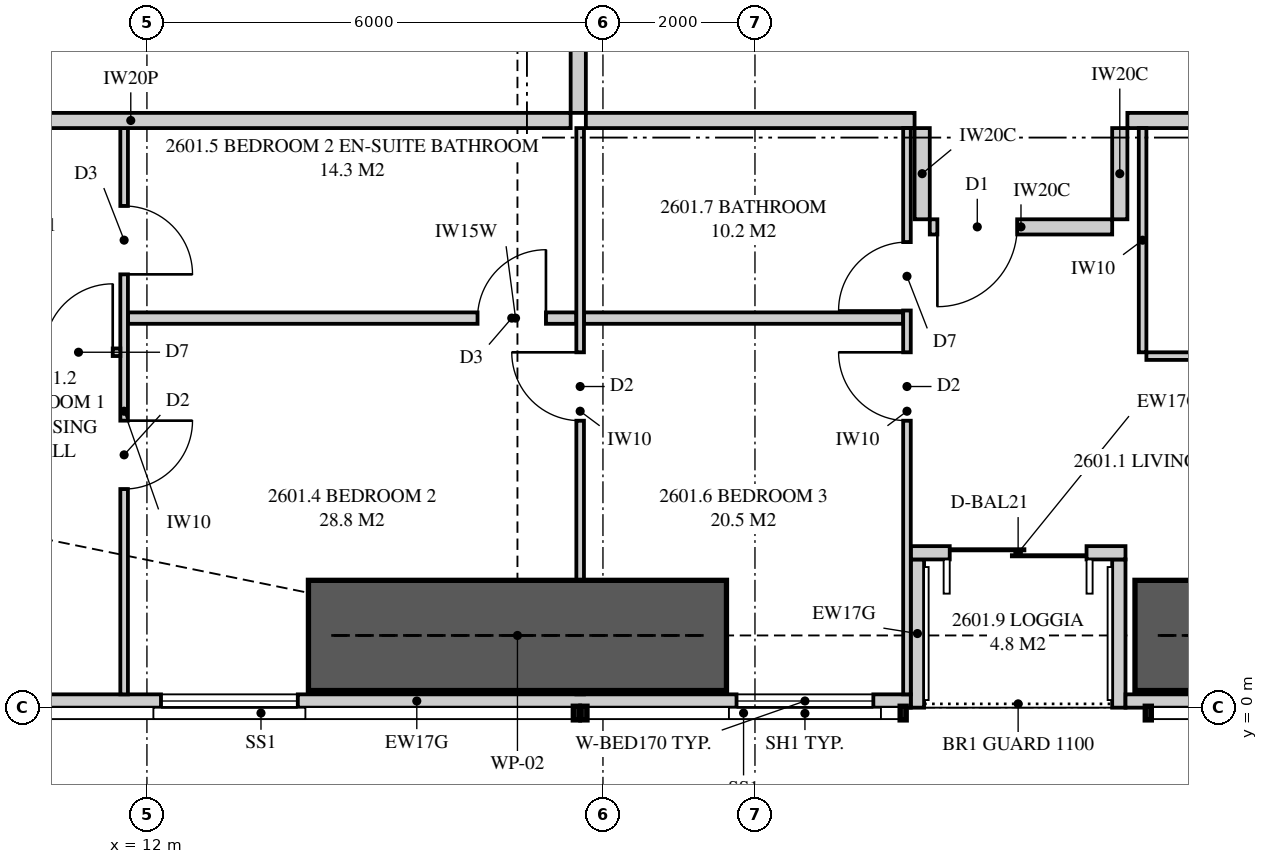
"""IFC4 building model, lengths in metres.
Left out: names, types, materials, properties, quantities, classifications, styles, units other than length and angle.
Written with IfcOpenShell. Run it as: python <this file> out.ifc"""

import sys

from ifc_helpers import new_model, si_unit, direction, frame, frame_2d, origin, place, context, subcontext, project, spatial, polyline, rectangle, outline, extrude, element, fill, save


model = new_model("IFC4")
c1 = context("Model", 3, precision=1e-05, world=origin(), true_north=direction((0.0, 1.0)))
c2 = subcontext(c1, "Body", "Model", "MODEL_VIEW")
j1 = project(units=[si_unit("LENGTHUNIT", "METRE"), si_unit("PLANEANGLEUNIT", "RADIAN")], contexts=[c1])
p1 = place(None, origin())
s1 = spatial("IfcSite", under=j1, at=p1, CompositionType="ELEMENT")
p2 = place(p1, origin())
s2 = spatial("IfcBuilding", under=s1, at=p2, CompositionType="ELEMENT")
p3 = place(p2, frame((0.0, 0.0, 98.15)))
s3 = spatial("IfcBuildingStorey", under=s2, at=p3, CompositionType="ELEMENT", Elevation=98.15)
p4 = place(p3, frame((9.051, 0.087, 0.0), z_axis=(0.0, 0.0, 1.0), x_axis=(1.0, 0.0, 0.0)))
e1 = element("IfcWall", 1, at=p4, inside=s3, PredefinedType="SOLIDWALL", context=c2, shape_type="SweptSolid", body=[
    extrude(outline(polyline([(0.0, 0.0), (12.999, 0.0), (12.999, 2.15), (7.824, 2.15), (7.824, 3.11), (7.666, 3.11), (7.666, 2.15), (7.62, 2.15), (7.62, 3.11), (0.0, 3.11), (0.0, 0.0)])), frame((0.0, 0.087, 0.0), z_axis=(0.0, -1.0, 0.0), x_axis=(1.0, 0.0, 0.0)), (0.0, 0.0, 1.0), 0.175),
])
p5 = place(p4, frame((3.134, 0.0, 0.4)))
e2 = element("IfcOpeningElement", 2, at=p5, cuts=e1, PredefinedType="OPENING", context=c2, shape_type="SweptSolid", body=[
    extrude(rectangle(XDim=1.8, YDim=1.7, at=frame_2d((0.9, 0.85))), frame((0.0, 0.097, 0.0), z_axis=(0.0, -1.0, 0.0), x_axis=(1.0, 0.0, 0.0)), (0.0, 0.0, 1.0), 0.195),
])
p6 = place(p4, frame((10.706, 0.0, 0.4)))
e3 = element("IfcOpeningElement", 3, at=p6, cuts=e1, PredefinedType="OPENING", context=c2, shape_type="SweptSolid", body=[
    extrude(rectangle(XDim=1.8, YDim=1.7, at=frame_2d((0.9, 0.85))), frame((0.0, 0.097, 0.0), z_axis=(0.0, -1.0, 0.0), x_axis=(1.0, 0.0, 0.0)), (0.0, 0.0, 1.0), 0.195),
])
p7 = place(p3, frame((24.875, 0.087, 0.0), z_axis=(0.0, 0.0, 1.0), x_axis=(1.0, 0.0, 0.0)))
e4 = element("IfcWall", 4, at=p7, inside=s3, PredefinedType="SOLIDWALL", context=c2, shape_type="SweptSolid", body=[
    extrude(rectangle(XDim=7.9, YDim=0.175, at=frame_2d((3.95, 0.0))), origin(), (0.0, 0.0, 1.0), 2.15),
])
p8 = place(p7, frame((5.725, 0.0, 0.4)))
e5 = element("IfcOpeningElement", 5, at=p8, cuts=e4, PredefinedType="OPENING", context=c2, shape_type="SweptSolid", body=[
    extrude(rectangle(XDim=1.8, YDim=1.7, at=frame_2d((0.9, 0.85))), frame((0.0, 0.097, 0.0), z_axis=(0.0, -1.0, 0.0), x_axis=(1.0, 0.0, 0.0)), (0.0, 0.0, 1.0), 0.195),
])
p9 = place(p3, frame((22.05, 2.038, 0.0), z_axis=(0.0, 0.0, 1.0), x_axis=(1.0, 0.0, 0.0)))
e6 = element("IfcWall", 6, at=p9, inside=s3, PredefinedType="SOLIDWALL", context=c2, shape_type="SweptSolid", body=[
    extrude(rectangle(XDim=2.825, YDim=0.175, at=frame_2d((1.413, 0.0))), origin(), (0.0, 0.0, 1.0), 3.11),
])
p10 = place(p9, frame((0.512, 0.0, 0.0)))
e7 = element("IfcOpeningElement", 7, at=p10, cuts=e6, PredefinedType="OPENING", context=c2, shape_type="SweptSolid", body=[
    extrude(rectangle(XDim=1.8, YDim=2.1, at=frame_2d((0.9, 1.05))), frame((0.0, 0.097, 0.0), z_axis=(0.0, -1.0, 0.0), x_axis=(1.0, 0.0, 0.0)), (0.0, 0.0, 1.0), 0.195),
])
for number, where, z_axis, x_axis in (
    (8, (22.137, 0.0, 0.0), (0.0, 0.0, 1.0), (0.0, 1.0, 0.0)),
    (9, (24.788, 0.0, 0.0), (0.0, 0.0, 1.0), (0.0, 1.0, 0.0)),
):
    element("IfcWall", number, at=place(p3, frame(where, z_axis=z_axis, x_axis=x_axis)), inside=s3, PredefinedType="SOLIDWALL", context=c2, shape_type="SweptSolid", body=[
        extrude(outline(polyline([(0.0, 0.0), (1.95, 0.0), (1.95, 3.11), (1.75, 3.11), (1.75, 2.15), (0.15, 2.15), (0.15, 3.11), (0.0, 3.11), (0.0, 0.0)])), frame((0.0, 0.087, 0.0), z_axis=(0.0, -1.0, 0.0), x_axis=(1.0, 0.0, 0.0)), (0.0, 0.0, 1.0), 0.175),
    ])
p11 = place(p3, frame((17.775, 7.725, 0.0), z_axis=(0.0, 0.0, 1.0), x_axis=(1.0, 0.0, 0.0)))
e10 = element("IfcWall", 10, at=p11, inside=s3, PredefinedType="PARTITIONING", context=c2, shape_type="SweptSolid", body=[
    extrude(rectangle(XDim=4.325, YDim=0.2, at=frame_2d((2.163, 0.0))), origin(), (0.0, 0.0, 1.0), 3.11),
])
p12 = place(p3, frame((11.7, 0.175, 0.0), z_axis=(0.0, 0.0, 1.0), x_axis=(0.0, 1.0, 0.0)))
e11 = element("IfcWall", 11, at=p12, inside=s3, PredefinedType="PARTITIONING", context=c2, shape_type="SweptSolid", body=[
    extrude(outline(polyline([(0.0, 0.0), (7.45, 0.0), (7.45, 3.11), (2.708, 3.11), (2.708, 2.15), (0.953, 2.15), (0.953, 3.11), (0.0, 3.11), (0.0, 0.0)])), frame((0.0, 0.05, 0.0), z_axis=(0.0, -1.0, 0.0), x_axis=(1.0, 0.0, 0.0)), (0.0, 0.0, 1.0), 0.1),
])
p13 = place(p12, frame((2.701, 0.0, 0.0)))
e12 = element("IfcOpeningElement", 12, at=p13, cuts=e11, PredefinedType="OPENING", context=c2, shape_type="SweptSolid", body=[
    extrude(rectangle(XDim=0.9, YDim=2.1, at=frame_2d((0.45, 1.05))), frame((0.0, 0.06, 0.0), z_axis=(0.0, -1.0, 0.0), x_axis=(1.0, 0.0, 0.0)), (0.0, 0.0, 1.0), 0.12),
])
p14 = place(p12, frame((5.525, 0.0, 0.0)))
e13 = element("IfcOpeningElement", 13, at=p14, cuts=e11, PredefinedType="OPENING", context=c2, shape_type="SweptSolid", body=[
    extrude(rectangle(XDim=0.9, YDim=2.1, at=frame_2d((0.45, 1.05))), frame((0.0, 0.06, 0.0), z_axis=(0.0, -1.0, 0.0), x_axis=(1.0, 0.0, 0.0)), (0.0, 0.0, 1.0), 0.12),
])
p15 = place(p3, frame((17.7, 0.175, 0.0), z_axis=(0.0, 0.0, 1.0), x_axis=(0.0, 1.0, 0.0)))
e14 = element("IfcWall", 14, at=p15, inside=s3, PredefinedType="PARTITIONING", context=c2, shape_type="SweptSolid", body=[
    extrude(outline(polyline([(1.635, 2.15), (0.0, 2.15), (0.0, 0.0), (7.45, 0.0), (7.45, 3.11), (1.635, 3.11), (1.635, 2.15)]), holes=[polyline([(1.021, 0.116), (0.529, 0.116), (0.529, 0.906), (1.021, 0.906), (1.021, 0.116)]), polyline([(1.021, 1.244), (0.529, 1.244), (0.529, 2.034), (1.021, 2.034), (1.021, 1.244)])]), frame((0.0, 0.05, 0.0), z_axis=(0.0, -1.0, 0.0), x_axis=(1.0, 0.0, 0.0)), (0.0, 0.0, 1.0), 0.1),
])
p16 = place(p15, frame((3.6, 0.0, 0.0)))
e15 = element("IfcOpeningElement", 15, at=p16, cuts=e14, PredefinedType="OPENING", context=c2, shape_type="SweptSolid", body=[
    extrude(rectangle(XDim=0.9, YDim=2.1, at=frame_2d((0.45, 1.05))), frame((0.0, 0.06, 0.0), z_axis=(0.0, -1.0, 0.0), x_axis=(1.0, 0.0, 0.0)), (0.0, 0.0, 1.0), 0.12),
])
p17 = place(p3, frame((22.0, 0.175, 0.0), z_axis=(0.0, 0.0, 1.0), x_axis=(0.0, 1.0, 0.0)))
e16 = element("IfcWall", 16, at=p17, inside=s3, PredefinedType="PARTITIONING", context=c2, shape_type="SweptSolid", body=[
    extrude(outline(polyline([(0.0, 0.0), (7.45, 0.0), (7.45, 3.11), (1.635, 3.11), (1.635, 2.15), (0.0, 2.15), (0.0, 3.11), (0.0, 0.0)])), frame((0.0, 0.05, 0.0), z_axis=(0.0, -1.0, 0.0), x_axis=(1.0, 0.0, 0.0)), (0.0, 0.0, 1.0), 0.1),
])
p18 = place(p17, frame((3.6, 0.0, 0.0)))
e17 = element("IfcOpeningElement", 17, at=p18, cuts=e16, PredefinedType="OPENING", context=c2, shape_type="SweptSolid", body=[
    extrude(rectangle(XDim=0.9, YDim=2.1, at=frame_2d((0.45, 1.05))), frame((0.0, 0.06, 0.0), z_axis=(0.0, -1.0, 0.0), x_axis=(1.0, 0.0, 0.0)), (0.0, 0.0, 1.0), 0.12),
])
p19 = place(p17, frame((5.05, 0.0, 0.0)))
e18 = element("IfcOpeningElement", 18, at=p19, cuts=e16, PredefinedType="OPENING", context=c2, shape_type="SweptSolid", body=[
    extrude(rectangle(XDim=0.9, YDim=2.1, at=frame_2d((0.45, 1.05))), frame((0.0, 0.06, 0.0), z_axis=(0.0, -1.0, 0.0), x_axis=(1.0, 0.0, 0.0)), (0.0, 0.0, 1.0), 0.12),
])
p20 = place(p3, frame((6.0, 4.676, 0.0), z_axis=(0.0, 0.0, 1.0), x_axis=(1.0, 0.0, 0.0)))
e19 = element("IfcWall", 19, at=p20, inside=s3, PredefinedType="PARTITIONING", context=c2, shape_type="SweptSolid", body=[
    extrude(outline(polyline([(0.0, 0.0), (5.65, 0.0), (5.65, 3.11), (5.46, 3.11), (5.46, 2.51), (3.171, 2.51), (3.171, 2.15), (1.429, 2.15), (1.429, 3.11), (0.0, 3.11), (0.0, 0.0)])), frame((0.0, 0.05, 0.0), z_axis=(0.0, -1.0, 0.0), x_axis=(1.0, 0.0, 0.0)), (0.0, 0.0, 1.0), 0.1),
])
p21 = place(p20, frame((4.65, 0.0, 0.0)))
e20 = element("IfcOpeningElement", 20, at=p21, cuts=e19, PredefinedType="OPENING", context=c2, shape_type="SweptSolid", body=[
    extrude(rectangle(XDim=0.9, YDim=2.1, at=frame_2d((0.45, 1.05))), frame((0.0, 0.06, 0.0), z_axis=(0.0, -1.0, 0.0), x_axis=(1.0, 0.0, 0.0)), (0.0, 0.0, 1.0), 0.12),
])
p22 = place(p3, frame((11.75, 5.125, 0.0), z_axis=(0.0, 0.0, 1.0), x_axis=(1.0, 0.0, 0.0)))
e21 = element("IfcWall", 21, at=p22, inside=s3, PredefinedType="PLUMBINGWALL", context=c2, shape_type="SweptSolid", body=[
    extrude(outline(polyline([(0.0, 0.0), (5.9, 0.0), (5.9, 3.11), (5.438, 3.11), (5.438, 2.541), (4.812, 2.541), (4.812, 3.11), (0.0, 3.11), (0.0, 0.0)])), frame((0.0, 0.075, 0.0), z_axis=(0.0, -1.0, 0.0), x_axis=(1.0, 0.0, 0.0)), (0.0, 0.0, 1.0), 0.15),
])
p23 = place(p22, frame((4.6, 0.0, 0.0)))
e22 = element("IfcOpeningElement", 22, at=p23, cuts=e21, PredefinedType="OPENING", context=c2, shape_type="SweptSolid", body=[
    extrude(rectangle(XDim=0.9, YDim=2.1, at=frame_2d((0.45, 1.05))), frame((0.0, 0.085, 0.0), z_axis=(0.0, -1.0, 0.0), x_axis=(1.0, 0.0, 0.0)), (0.0, 0.0, 1.0), 0.17),
])
p24 = place(p3, frame((17.75, 5.125, 0.0), z_axis=(0.0, 0.0, 1.0), x_axis=(1.0, 0.0, 0.0)))
e23 = element("IfcWall", 23, at=p24, inside=s3, PredefinedType="PLUMBINGWALL", context=c2, shape_type="SweptSolid", body=[
    extrude(rectangle(XDim=4.2, YDim=0.15, at=frame_2d((2.1, 0.0))), origin(), (0.0, 0.0, 1.0), 3.11),
])
p25 = place(p3, frame((25.15, 4.625, 0.0), z_axis=(0.0, 0.0, 1.0), x_axis=(1.0, 0.0, 0.0)))
e24 = element("IfcWall", 24, at=p25, inside=s3, PredefinedType="PARTITIONING", context=c2, shape_type="SweptSolid", body=[
    extrude(outline(polyline([(0.0, 0.0), (3.55, 0.0), (3.55, 3.11), (2.887, 3.11), (2.887, 2.541), (2.312, 2.541), (2.312, 3.11), (0.0, 3.11), (0.0, 0.0)])), frame((0.0, 0.05, 0.0), z_axis=(0.0, -1.0, 0.0), x_axis=(1.0, 0.0, 0.0)), (0.0, 0.0, 1.0), 0.1),
])
p26 = place(p25, frame((1.3, 0.0, 0.0)))
e25 = element("IfcOpeningElement", 25, at=p26, cuts=e24, PredefinedType="OPENING", context=c2, shape_type="SweptSolid", body=[
    extrude(rectangle(XDim=0.9, YDim=2.1, at=frame_2d((0.45, 1.05))), frame((0.0, 0.06, 0.0), z_axis=(0.0, -1.0, 0.0), x_axis=(1.0, 0.0, 0.0)), (0.0, 0.0, 1.0), 0.12),
])
p27 = place(p3, frame((25.1, 4.675, 0.0), z_axis=(0.0, 0.0, 1.0), x_axis=(0.0, 1.0, 0.0)))
e26 = element("IfcWall", 26, at=p27, inside=s3, PredefinedType="PARTITIONING", context=c2, shape_type="SweptSolid", body=[
    extrude(rectangle(XDim=2.95, YDim=0.1, at=frame_2d((1.475, 0.0))), origin(), (0.0, 0.0, 1.0), 3.11),
])
p28 = place(p3, frame((6.0, 7.725, 0.0), z_axis=(0.0, 0.0, 1.0), x_axis=(1.0, 0.0, 0.0)))
e27 = element("IfcWall", 27, at=p28, inside=s3, PredefinedType="PARTITIONING", context=c2, shape_type="SweptSolid", body=[
    extrude(outline(polyline([(0.0, 0.0), (11.575, 0.0), (11.575, 3.11), (11.212, 3.11), (11.212, 2.541), (10.538, 2.541), (10.538, 3.11), (5.51, 3.11), (5.51, 2.51), (2.969, 2.51), (2.969, 2.541), (2.727, 2.541), (2.727, 2.15), (0.884, 2.15), (0.884, 3.11), (0.0, 3.11), (0.0, 0.0)])), frame((0.0, 0.1, 0.0), z_axis=(0.0, -1.0, 0.0), x_axis=(1.0, 0.0, 0.0)), (0.0, 0.0, 1.0), 0.2),
])
p29 = place(p3, frame((17.675, 7.825, 0.0), z_axis=(0.0, 0.0, 1.0), x_axis=(0.0, 1.0, 0.0)))
e28 = element("IfcWall", 28, at=p29, inside=s3, PredefinedType="PARTITIONING", context=c2, shape_type="SweptSolid", body=[
    extrude(outline(polyline([(0.0, 0.0), (5.825, 0.0), (5.825, 3.11), (3.087, 3.11), (3.087, 2.541), (2.413, 2.541), (2.413, 3.11), (0.0, 3.11), (0.0, 0.0)])), frame((0.0, 0.1, 0.0), z_axis=(0.0, -1.0, 0.0), x_axis=(1.0, 0.0, 0.0)), (0.0, 0.0, 1.0), 0.2),
])
p30 = place(p29, frame((2.337, 0.0, 0.0)))
e29 = element("IfcOpeningElement", 29, at=p30, cuts=e28, PredefinedType="OPENING", context=c2, shape_type="SweptSolid", body=[
    extrude(rectangle(XDim=1.8, YDim=2.1, at=frame_2d((0.9, 1.05))), frame((0.0, 0.11, 0.0), z_axis=(0.0, -1.0, 0.0), x_axis=(1.0, 0.0, 0.0)), (0.0, 0.0, 1.0), 0.22),
])
p31 = place(p3, frame((24.9, 7.725, 0.0), z_axis=(0.0, 0.0, 1.0), x_axis=(1.0, 0.0, 0.0)))
e30 = element("IfcWall", 30, at=p31, inside=s3, PredefinedType="PARTITIONING", context=c2, shape_type="SweptSolid", body=[
    extrude(outline(polyline([(0.0, 0.0), (3.8, 0.0), (3.8, 3.11), (3.187, 3.11), (3.187, 2.541), (2.513, 2.541), (2.513, 3.11), (0.0, 3.11), (0.0, 0.0)])), frame((0.0, 0.1, 0.0), z_axis=(0.0, -1.0, 0.0), x_axis=(1.0, 0.0, 0.0)), (0.0, 0.0, 1.0), 0.2),
])
p32 = place(p3, frame((22.3, 6.325, 0.0), z_axis=(0.0, 0.0, 1.0), x_axis=(1.0, 0.0, 0.0)))
e31 = element("IfcWall", 31, at=p32, inside=s3, PredefinedType="PARTITIONING", context=c2, shape_type="SweptSolid", body=[
    extrude(rectangle(XDim=2.4, YDim=0.2, at=frame_2d((1.2, 0.0))), origin(), (0.0, 0.0, 1.0), 3.11),
])
p33 = place(p32, frame((0.1, 0.0, 0.0)))
e32 = element("IfcOpeningElement", 32, at=p33, cuts=e31, PredefinedType="OPENING", context=c2, shape_type="SweptSolid", body=[
    extrude(rectangle(XDim=1.05, YDim=2.2, at=frame_2d((0.525, 1.1))), frame((0.0, 0.11, 0.0), z_axis=(0.0, -1.0, 0.0), x_axis=(1.0, 0.0, 0.0)), (0.0, 0.0, 1.0), 0.22),
])
for number, where, z_axis, x_axis in (
    (33, (22.2, 7.625, 0.0), (0.0, 0.0, 1.0), (0.0, -1.0, 0.0)),
    (34, (24.8, 7.625, 0.0), (0.0, 0.0, 1.0), (0.0, -1.0, 0.0)),
):
    element("IfcWall", number, at=place(p3, frame(where, z_axis=z_axis, x_axis=x_axis)), inside=s3, PredefinedType="PARTITIONING", context=c2, shape_type="SweptSolid", body=[
        extrude(rectangle(XDim=1.2, YDim=0.2, at=frame_2d((0.6, 0.0))), origin(), (0.0, 0.0, 1.0), 3.11),
    ])
for number, where, z_axis, x_axis in (
    (35, (14.125, 0.95, 0.0), (0.0, 0.0, 1.0), (1.0, 0.0, 0.0)),
    (36, (25.0, 0.95, 0.0), (0.0, 0.0, 1.0), (1.0, 0.0, 0.0)),
):
    element("IfcWall", number, at=place(p3, frame(where, z_axis=z_axis, x_axis=x_axis)), inside=s3, PredefinedType="SHEAR", context=c2, shape_type="SweptSolid", body=[
        extrude(rectangle(XDim=5.5, YDim=1.45, at=frame_2d((2.75, 0.0))), origin(), (0.0, 0.0, 1.0), 3.35),
    ])
p34 = place(p5, origin())
e37 = element("IfcWindow", 37, at=p34, inside=s3, PartitioningType="SINGLE_PANEL", PredefinedType="WINDOW", context=c2, shape_type="SweptSolid", body=[
    extrude(rectangle(XDim=1.8, YDim=1.7, at=frame_2d((0.9, 0.85))), frame((0.0, 0.03, 0.0), z_axis=(0.0, -1.0, 0.0), x_axis=(1.0, 0.0, 0.0)), (0.0, 0.0, 1.0), 0.06),
])
fill(e2, e37)
p35 = place(p6, origin())
e38 = element("IfcWindow", 38, at=p35, inside=s3, PartitioningType="SINGLE_PANEL", PredefinedType="WINDOW", context=c2, shape_type="SweptSolid", body=[
    extrude(rectangle(XDim=1.8, YDim=1.7, at=frame_2d((0.9, 0.85))), frame((0.0, 0.03, 0.0), z_axis=(0.0, -1.0, 0.0), x_axis=(1.0, 0.0, 0.0)), (0.0, 0.0, 1.0), 0.06),
])
fill(e3, e38)
p36 = place(p10, origin())
e39 = element("IfcDoor", 39, at=p36, inside=s3, OperationType="SLIDING_TO_LEFT", PredefinedType="DOOR", context=c2, shape_type="SweptSolid", body=[
    extrude(rectangle(XDim=1.8, YDim=2.1, at=frame_2d((0.9, 1.05))), frame((0.0, 0.025, 0.0), z_axis=(0.0, -1.0, 0.0), x_axis=(1.0, 0.0, 0.0)), (0.0, 0.0, 1.0), 0.05),
])
fill(e7, e39)
p37 = place(p33, frame((1.05, 0.0, 0.0), z_axis=(0.0, 0.0, 1.0), x_axis=(-1.0, 0.0, 0.0)))
e40 = element("IfcDoor", 40, at=p37, inside=s3, OperationType="SINGLE_SWING_RIGHT", PredefinedType="DOOR", context=c2, shape_type="SweptSolid", body=[
    extrude(rectangle(XDim=1.05, YDim=2.2, at=frame_2d((0.525, 1.1))), frame((0.0, 0.025, 0.0), z_axis=(0.0, -1.0, 0.0), x_axis=(1.0, 0.0, 0.0)), (0.0, 0.0, 1.0), 0.05),
])
fill(e32, e40)
p38 = place(p21, origin())
e41 = element("IfcDoor", 41, at=p38, inside=s3, OperationType="SINGLE_SWING_RIGHT", PredefinedType="DOOR", context=c2, shape_type="SweptSolid", body=[
    extrude(rectangle(XDim=0.9, YDim=2.1, at=frame_2d((0.45, 1.05))), frame((0.0, 0.025, 0.0), z_axis=(0.0, -1.0, 0.0), x_axis=(1.0, 0.0, 0.0)), (0.0, 0.0, 1.0), 0.05),
])
fill(e20, e41)
p39 = place(p13, frame((0.9, 0.0, 0.0), z_axis=(0.0, 0.0, 1.0), x_axis=(-1.0, 0.0, 0.0)))
e42 = element("IfcDoor", 42, at=p39, inside=s3, OperationType="SINGLE_SWING_LEFT", PredefinedType="DOOR", context=c2, shape_type="SweptSolid", body=[
    extrude(rectangle(XDim=0.9, YDim=2.1, at=frame_2d((0.45, 1.05))), frame((0.0, 0.025, 0.0), z_axis=(0.0, -1.0, 0.0), x_axis=(1.0, 0.0, 0.0)), (0.0, 0.0, 1.0), 0.05),
])
fill(e12, e42)
p40 = place(p16, origin())
e43 = element("IfcDoor", 43, at=p40, inside=s3, OperationType="SINGLE_SWING_RIGHT", PredefinedType="DOOR", context=c2, shape_type="SweptSolid", body=[
    extrude(rectangle(XDim=0.9, YDim=2.1, at=frame_2d((0.45, 1.05))), frame((0.0, 0.025, 0.0), z_axis=(0.0, -1.0, 0.0), x_axis=(1.0, 0.0, 0.0)), (0.0, 0.0, 1.0), 0.05),
])
fill(e15, e43)
p41 = place(p23, origin())
e44 = element("IfcDoor", 44, at=p41, inside=s3, OperationType="SINGLE_SWING_RIGHT", PredefinedType="DOOR", context=c2, shape_type="SweptSolid", body=[
    extrude(rectangle(XDim=0.9, YDim=2.1, at=frame_2d((0.45, 1.05))), frame((0.0, 0.025, 0.0), z_axis=(0.0, -1.0, 0.0), x_axis=(1.0, 0.0, 0.0)), (0.0, 0.0, 1.0), 0.05),
])
fill(e22, e44)
p42 = place(p18, origin())
e45 = element("IfcDoor", 45, at=p42, inside=s3, OperationType="SINGLE_SWING_RIGHT", PredefinedType="DOOR", context=c2, shape_type="SweptSolid", body=[
    extrude(rectangle(XDim=0.9, YDim=2.1, at=frame_2d((0.45, 1.05))), frame((0.0, 0.025, 0.0), z_axis=(0.0, -1.0, 0.0), x_axis=(1.0, 0.0, 0.0)), (0.0, 0.0, 1.0), 0.05),
])
fill(e17, e45)
p43 = place(p19, origin())
e46 = element("IfcDoor", 46, at=p43, inside=s3, OperationType="SINGLE_SWING_LEFT", PredefinedType="DOOR", context=c2, shape_type="SweptSolid", body=[
    extrude(rectangle(XDim=0.9, YDim=2.1, at=frame_2d((0.45, 1.05))), frame((0.0, 0.025, 0.0), z_axis=(0.0, -1.0, 0.0), x_axis=(1.0, 0.0, 0.0)), (0.0, 0.0, 1.0), 0.05),
])
fill(e18, e46)
p44 = place(p14, frame((0.9, 0.0, 0.0), z_axis=(0.0, 0.0, 1.0), x_axis=(-1.0, 0.0, 0.0)))
e47 = element("IfcDoor", 47, at=p44, inside=s3, OperationType="SINGLE_SWING_RIGHT", PredefinedType="DOOR", context=c2, shape_type="SweptSolid", body=[
    extrude(rectangle(XDim=0.9, YDim=2.1, at=frame_2d((0.45, 1.05))), frame((0.0, 0.025, 0.0), z_axis=(0.0, -1.0, 0.0), x_axis=(1.0, 0.0, 0.0)), (0.0, 0.0, 1.0), 0.05),
])
fill(e13, e47)
save(model, sys.argv[1])
